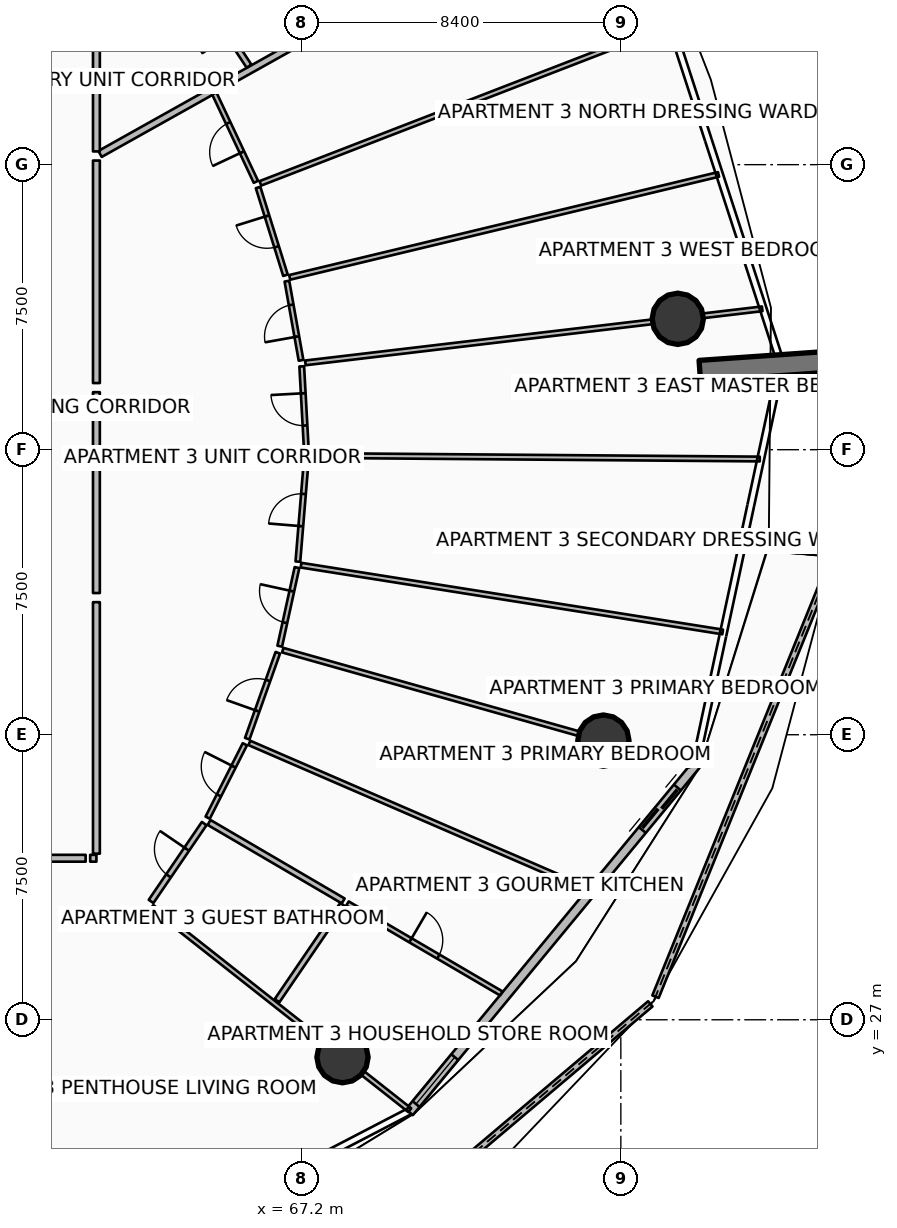
"""IFC4 building model, lengths in metres.
Left out: names, types, materials, properties, quantities, classifications, styles, units other than length and angle.
Written with IfcOpenShell. Run it as: python <this file> out.ifc"""

import sys

from ifc_helpers import new_model, si_unit, direction, frame, frame_2d, origin, origin_2d, place, context, subcontext, project, spatial, polyline, rectangle, circle, outline, extrude, element, fill, save


model = new_model("IFC4")
c1 = context("Model", 3, precision=1e-05, world=origin(), true_north=direction((0.0, 1.0)))
c2 = subcontext(c1, "Body", "Model", "MODEL_VIEW")
j1 = project(units=[si_unit("LENGTHUNIT", "METRE"), si_unit("PLANEANGLEUNIT", "RADIAN")], contexts=[c1])
p1 = place(None, origin())
s1 = spatial("IfcSite", under=j1, at=p1, CompositionType="ELEMENT")
p2 = place(p1, origin())
s2 = spatial("IfcBuilding", under=s1, at=p2, CompositionType="ELEMENT")
p3 = place(p2, frame((0.0, 0.0, 67.65)))
s3 = spatial("IfcBuildingStorey", under=s2, at=p3, CompositionType="ELEMENT", Elevation=67.65)
p4 = place(p3, frame((77.678, 44.075, 0.0), z_axis=(0.0, 0.0, 1.0), x_axis=(0.997564163539, 0.069754853754, 0.0)))
e1 = element("IfcWall", 1, at=p4, inside=s3, PredefinedType="SOLIDWALL", context=c2, shape_type="SweptSolid", body=[
    extrude(rectangle(XDim=3.5, YDim=0.55, at=frame_2d((1.75, 0.0))), origin(), (0.0, 0.0, 1.0), 3.75),
])
for number, where, z_axis, x_axis in (
    (2, (68.276, 26.016, 0.0), (0.0, 0.0, 1.0), (1.0, 0.0, 0.0)),
    (3, (75.141, 34.345, 0.0), (0.0, 0.0, 1.0), (1.0, 0.0, 0.0)),
    (4, (77.098, 45.444, 0.0), (0.0, 0.0, 1.0), (1.0, 0.0, 0.0)),
):
    element("IfcColumn", number, at=place(p3, frame(where, z_axis=z_axis, x_axis=x_axis)), inside=s3, PredefinedType="COLUMN", context=c2, shape_type="SweptSolid", body=[
        extrude(circle(Radius=0.675, at=origin_2d()), origin(), (0.0, 0.0, 1.0), 3.35),
    ])
p5 = place(p3, frame((67.267, 19.719, 0.0), z_axis=(0.0, 0.0, 1.0), x_axis=(0.763702211542, 0.645568688898, 0.0)))
e5 = element("IfcWall", 5, at=p5, inside=s3, PredefinedType="PARAPET", context=c2, shape_type="SweptSolid", body=[
    extrude(outline(polyline([(0.0, 0.0), (11.927, 0.0), (11.927, 1.632), (5.963, 1.798), (0.0, 1.86), (0.0, 0.0)])), frame((0.0, 0.09, 0.0), z_axis=(0.0, -1.0, 0.0), x_axis=(1.0, 0.0, 0.0)), (0.0, 0.0, 1.0), 0.18),
])
p6 = place(p3, frame((76.512, 27.607, 0.0), z_axis=(0.0, 0.0, 1.0), x_axis=(0.375733690411, 0.926727680546, 0.0)))
e6 = element("IfcWall", 6, at=p6, inside=s3, PredefinedType="PARAPET", context=c2, shape_type="SweptSolid", body=[
    extrude(outline(polyline([(0.0, 0.0), (12.491, 0.0), (12.491, 1.233), (6.246, 1.418), (0.0, 1.632), (0.0, 0.0)])), frame((0.0, 0.09, 0.0), z_axis=(0.0, -1.0, 0.0), x_axis=(1.0, 0.0, 0.0)), (0.0, 0.0, 1.0), 0.18),
])
p7 = place(p3, frame((70.033, 24.567, 0.0), z_axis=(0.0, 0.0, 1.0), x_axis=(0.636674332663, 0.771132799281, 0.0)))
e7 = element("IfcWall", 7, at=p7, inside=s3, PredefinedType="SOLIDWALL", context=c2, shape_type="SweptSolid", body=[
    extrude(rectangle(XDim=11.851, YDim=0.24, at=frame_2d((5.926, 0.0))), origin(), (0.0, 0.0, 1.0), 2.3),
])
p8 = place(p7, frame((9.631, 0.0, 0.0)))
e8 = element("IfcOpeningElement", 8, at=p8, cuts=e7, PredefinedType="OPENING", context=c2, shape_type="SweptSolid", body=[
    extrude(rectangle(XDim=1.45, YDim=2.15, at=frame_2d((0.725, 1.075))), frame((0.0, 0.13, 0.0), z_axis=(0.0, -1.0, 0.0), x_axis=(1.0, 0.0, 0.0)), (0.0, 0.0, 1.0), 0.26),
])
p9 = place(p7, frame((0.28, 0.0, 0.65)))
e9 = element("IfcOpeningElement", 9, at=p9, cuts=e7, PredefinedType="OPENING", context=c2, shape_type="SweptSolid", body=[
    extrude(rectangle(XDim=1.6, YDim=1.5, at=frame_2d((0.8, 0.75))), frame((0.0, 0.13, 0.0), z_axis=(0.0, -1.0, 0.0), x_axis=(1.0, 0.0, 0.0)), (0.0, 0.0, 1.0), 0.26),
])
p10 = place(p3, frame((61.896, 49.782, 0.0), z_axis=(0.0, 0.0, 1.0), x_axis=(0.872493215695, 0.488626225828, 0.0)))
e10 = element("IfcWall", 10, at=p10, inside=s3, PredefinedType="PARTITIONING", context=c2, shape_type="SweptSolid", body=[
    extrude(rectangle(XDim=15.612, YDim=0.18, at=frame_2d((7.806, 0.0))), origin(), (0.0, 0.0, 1.0), 2.717),
])
p11 = place(p3, frame((54.14, 31.25, 0.0), z_axis=(0.0, 0.0, 1.0), x_axis=(1.0, 0.0, 0.0)))
e11 = element("IfcWall", 11, at=p11, inside=s3, PredefinedType="PARTITIONING", context=c2, shape_type="SweptSolid", body=[
    extrude(rectangle(XDim=7.376, YDim=0.18, at=frame_2d((3.688, 0.0))), origin(), (0.0, 0.0, 1.0), 2.717),
])
p12 = place(p11, frame((3.138, 0.0, 0.0)))
e12 = element("IfcOpeningElement", 12, at=p12, cuts=e11, PredefinedType="OPENING", context=c2, shape_type="SweptSolid", body=[
    extrude(rectangle(XDim=1.1, YDim=2.1, at=frame_2d((0.55, 1.05))), frame((0.0, 0.1, 0.0), z_axis=(0.0, -1.0, 0.0), x_axis=(1.0, 0.0, 0.0)), (0.0, 0.0, 1.0), 0.2),
])
p13 = place(p3, frame((61.636, 31.25, 0.0), z_axis=(0.0, 0.0, 1.0), x_axis=(1.0, 0.0, 0.0)))
e13 = element("IfcWall", 13, at=p13, inside=s3, PredefinedType="PARTITIONING", context=c2, shape_type="SweptSolid", body=[
    extrude(rectangle(XDim=0.164, YDim=0.18, at=frame_2d((0.082, 0.0))), origin(), (0.0, 0.0, 1.0), 2.717),
])
p14 = place(p3, frame((61.8, 31.37, 0.0), z_axis=(0.0, 0.0, 1.0), x_axis=(0.0, 1.0, 0.0)))
e14 = element("IfcWall", 14, at=p14, inside=s3, PredefinedType="PARTITIONING", context=c2, shape_type="SweptSolid", body=[
    extrude(rectangle(XDim=6.618, YDim=0.18, at=frame_2d((3.309, 0.0))), origin(), (0.0, 0.0, 1.0), 2.717),
])
p15 = place(p3, frame((63.261, 29.969, 0.0), z_axis=(0.0, 0.0, 1.0), x_axis=(0.78531804627, -0.619092534443, 0.0)))
e15 = element("IfcWall", 15, at=p15, inside=s3, PredefinedType="PARTITIONING", context=c2, shape_type="SweptSolid", body=[
    extrude(rectangle(XDim=8.639, YDim=0.125, at=frame_2d((4.32, 0.0))), origin(), (0.0, 0.0, 1.0), 2.717),
])
p16 = place(p3, frame((63.239, 30.114, 0.0), z_axis=(0.0, 0.0, 1.0), x_axis=(0.563437614894, 0.826158613174, 0.0)))
e16 = element("IfcWall", 16, at=p16, inside=s3, PredefinedType="PARTITIONING", context=c2, shape_type="SweptSolid", body=[
    extrude(rectangle(XDim=2.48, YDim=0.15, at=frame_2d((1.24, 0.0))), origin(), (0.0, 0.0, 1.0), 2.717),
])
p17 = place(p16, frame((0.815, 0.0, 0.0)))
e17 = element("IfcOpeningElement", 17, at=p17, cuts=e16, PredefinedType="OPENING", context=c2, shape_type="SweptSolid", body=[
    extrude(rectangle(XDim=0.85, YDim=2.06, at=frame_2d((0.425, 1.03))), frame((0.0, 0.085, 0.0), z_axis=(0.0, -1.0, 0.0), x_axis=(1.0, 0.0, 0.0)), (0.0, 0.0, 1.0), 0.17),
])
p18 = place(p3, frame((66.553, 27.501, 0.0), z_axis=(0.0, 0.0, 1.0), x_axis=(0.563388764178, 0.826191927095, 0.0)))
e18 = element("IfcWall", 18, at=p18, inside=s3, PredefinedType="PARTITIONING", context=c2, shape_type="SweptSolid", body=[
    extrude(rectangle(XDim=3.063, YDim=0.15, at=frame_2d((1.531, 0.0))), origin(), (0.0, 0.0, 1.0), 2.717),
])
p19 = place(p3, frame((64.765, 32.192, 0.0), z_axis=(0.0, 0.0, 1.0), x_axis=(0.863128698129, -0.504984010109, 0.0)))
e19 = element("IfcWall", 19, at=p19, inside=s3, PredefinedType="PARTITIONING", context=c2, shape_type="SweptSolid", body=[
    extrude(rectangle(XDim=4.09, YDim=0.15, at=frame_2d((2.045, 0.0))), origin(), (0.0, 0.0, 1.0), 2.79),
])
p20 = place(p3, frame((68.407, 30.061, 0.0), z_axis=(0.0, 0.0, 1.0), x_axis=(0.863132370473, -0.504977733214, 0.0)))
e20 = element("IfcWall", 20, at=p20, inside=s3, PredefinedType="PARTITIONING", context=c2, shape_type="SweptSolid", body=[
    extrude(rectangle(XDim=4.689, YDim=0.125, at=frame_2d((2.345, 0.0))), origin(), (0.0, 0.0, 1.0), 2.79),
])
p21 = place(p20, frame((1.919, 0.0, 0.0)))
e21 = element("IfcOpeningElement", 21, at=p21, cuts=e20, PredefinedType="OPENING", context=c2, shape_type="SweptSolid", body=[
    extrude(rectangle(XDim=0.85, YDim=2.06, at=frame_2d((0.425, 1.03))), frame((0.0, 0.073, 0.0), z_axis=(0.0, -1.0, 0.0), x_axis=(1.0, 0.0, 0.0)), (0.0, 0.0, 1.0), 0.145),
])
p22 = place(p3, frame((65.825, 34.285, 0.0), z_axis=(0.0, 0.0, 1.0), x_axis=(0.917721842762, -0.39722363892, 0.0)))
e22 = element("IfcWall", 22, at=p22, inside=s3, PredefinedType="PARTITIONING", context=c2, shape_type="SweptSolid", body=[
    extrude(rectangle(XDim=9.694, YDim=0.125, at=frame_2d((4.847, 0.0))), origin(), (0.0, 0.0, 1.0), 2.79),
])
p23 = place(p3, frame((64.728, 32.317, 0.0), z_axis=(0.0, 0.0, 1.0), x_axis=(0.451897802863, 0.892069714634, 0.0)))
e23 = element("IfcWall", 23, at=p23, inside=s3, PredefinedType="PARTITIONING", context=c2, shape_type="SweptSolid", body=[
    extrude(rectangle(XDim=2.165, YDim=0.125, at=frame_2d((1.083, 0.0))), origin(), (0.0, 0.0, 1.0), 2.79),
])
p24 = place(p23, frame((0.658, 0.0, 0.0)))
e24 = element("IfcOpeningElement", 24, at=p24, cuts=e23, PredefinedType="OPENING", context=c2, shape_type="SweptSolid", body=[
    extrude(rectangle(XDim=0.85, YDim=2.06, at=frame_2d((0.425, 1.03))), frame((0.0, 0.073, 0.0), z_axis=(0.0, -1.0, 0.0), x_axis=(1.0, 0.0, 0.0)), (0.0, 0.0, 1.0), 0.145),
])
p25 = place(p3, frame((65.769, 34.396, 0.0), z_axis=(0.0, 0.0, 1.0), x_axis=(0.335079884685, 0.942189721277, 0.0)))
e25 = element("IfcWall", 25, at=p25, inside=s3, PredefinedType="PARTITIONING", context=c2, shape_type="SweptSolid", body=[
    extrude(rectangle(XDim=2.401, YDim=0.125, at=frame_2d((1.2, 0.0))), origin(), (0.0, 0.0, 1.0), 2.717),
])
p26 = place(p25, frame((0.775, 0.0, 0.0)))
e26 = element("IfcOpeningElement", 26, at=p26, cuts=e25, PredefinedType="OPENING", context=c2, shape_type="SweptSolid", body=[
    extrude(rectangle(XDim=0.85, YDim=2.06, at=frame_2d((0.425, 1.03))), frame((0.0, 0.073, 0.0), z_axis=(0.0, -1.0, 0.0), x_axis=(1.0, 0.0, 0.0)), (0.0, 0.0, 1.0), 0.145),
])
p27 = place(p3, frame((61.8, 38.228, 0.0), z_axis=(0.0, 0.0, 1.0), x_axis=(0.0, 1.0, 0.0)))
e27 = element("IfcWall", 27, at=p27, inside=s3, PredefinedType="PARTITIONING", context=c2, shape_type="SweptSolid", body=[
    extrude(rectangle(XDim=5.285, YDim=0.18, at=frame_2d((2.643, 0.0))), origin(), (0.0, 0.0, 1.0), 2.717),
])
p28 = place(p3, frame((66.703, 36.725, 0.0), z_axis=(0.0, 0.0, 1.0), x_axis=(0.962456868727, -0.271434662195, 0.0)))
e28 = element("IfcWall", 28, at=p28, inside=s3, PredefinedType="PARTITIONING", context=c2, shape_type="SweptSolid", body=[
    extrude(rectangle(XDim=11.141, YDim=0.125, at=frame_2d((5.571, 0.0))), origin(), (0.0, 0.0, 1.0), 2.717),
])
p29 = place(p3, frame((67.184, 38.962, 0.0), z_axis=(0.0, 0.0, 1.0), x_axis=(0.987685842404, -0.156450237182, 0.0)))
e29 = element("IfcWall", 29, at=p29, inside=s3, PredefinedType="PARTITIONING", context=c2, shape_type="SweptSolid", body=[
    extrude(rectangle(XDim=11.234, YDim=0.125, at=frame_2d((5.617, 0.0))), origin(), (0.0, 0.0, 1.0), 2.79),
])
p30 = place(p3, frame((67.422, 41.847, 0.0), z_axis=(0.0, 0.0, 1.0), x_axis=(0.999969106173, -0.007860451618, 0.0)))
e30 = element("IfcWall", 30, at=p30, inside=s3, PredefinedType="PARTITIONING", context=c2, shape_type="SweptSolid", body=[
    extrude(rectangle(XDim=11.833, YDim=0.125, at=frame_2d((5.917, 0.0))), origin(), (0.0, 0.0, 1.0), 2.79),
])
p31 = place(p3, frame((66.624, 36.83, 0.0), z_axis=(0.0, 0.0, 1.0), x_axis=(0.214316036982, 0.976764370917, 0.0)))
e31 = element("IfcWall", 31, at=p31, inside=s3, PredefinedType="PARTITIONING", context=c2, shape_type="SweptSolid", body=[
    extrude(rectangle(XDim=2.116, YDim=0.125, at=frame_2d((1.058, 0.0))), origin(), (0.0, 0.0, 1.0), 2.717),
])
p32 = place(p31, frame((0.633, 0.0, 0.0)))
e32 = element("IfcOpeningElement", 32, at=p32, cuts=e31, PredefinedType="OPENING", context=c2, shape_type="SweptSolid", body=[
    extrude(rectangle(XDim=0.85, YDim=2.06, at=frame_2d((0.425, 1.03))), frame((0.0, 0.073, 0.0), z_axis=(0.0, -1.0, 0.0), x_axis=(1.0, 0.0, 0.0)), (0.0, 0.0, 1.0), 0.145),
])
p33 = place(p3, frame((67.102, 39.055, 0.0), z_axis=(0.0, 0.0, 1.0), x_axis=(0.082325550285, 0.996605490538, 0.0)))
e33 = element("IfcWall", 33, at=p33, inside=s3, PredefinedType="PARTITIONING", context=c2, shape_type="SweptSolid", body=[
    extrude(rectangle(XDim=2.722, YDim=0.125, at=frame_2d((1.361, 0.0))), origin(), (0.0, 0.0, 1.0), 2.79),
])
p34 = place(p33, frame((0.936, 0.0, 0.0)))
e34 = element("IfcOpeningElement", 34, at=p34, cuts=e33, PredefinedType="OPENING", context=c2, shape_type="SweptSolid", body=[
    extrude(rectangle(XDim=0.85, YDim=2.06, at=frame_2d((0.425, 1.03))), frame((0.0, 0.073, 0.0), z_axis=(0.0, -1.0, 0.0), x_axis=(1.0, 0.0, 0.0)), (0.0, 0.0, 1.0), 0.145),
])
p35 = place(p3, frame((67.328, 41.928, 0.0), z_axis=(0.0, 0.0, 1.0), x_axis=(-0.054903584575, 0.998491660657, 0.0)))
e35 = element("IfcWall", 35, at=p35, inside=s3, PredefinedType="PARTITIONING", context=c2, shape_type="SweptSolid", body=[
    extrude(rectangle(XDim=2.268, YDim=0.125, at=frame_2d((1.134, 0.0))), origin(), (0.0, 0.0, 1.0), 2.717),
])
p36 = place(p35, frame((0.709, 0.0, 0.0)))
e36 = element("IfcOpeningElement", 36, at=p36, cuts=e35, PredefinedType="OPENING", context=c2, shape_type="SweptSolid", body=[
    extrude(rectangle(XDim=0.85, YDim=2.06, at=frame_2d((0.425, 1.03))), frame((0.0, 0.073, 0.0), z_axis=(0.0, -1.0, 0.0), x_axis=(1.0, 0.0, 0.0)), (0.0, 0.0, 1.0), 0.145),
])
p37 = place(p3, frame((61.8, 43.753, 0.0), z_axis=(0.0, 0.0, 1.0), x_axis=(0.0, 1.0, 0.0)))
e37 = element("IfcWall", 37, at=p37, inside=s3, PredefinedType="PARTITIONING", context=c2, shape_type="SweptSolid", body=[
    extrude(rectangle(XDim=5.855, YDim=0.18, at=frame_2d((2.927, 0.0))), origin(), (0.0, 0.0, 1.0), 2.717),
])
p38 = place(p3, frame((67.298, 44.284, 0.0), z_axis=(0.0, 0.0, 1.0), x_axis=(0.993068589749, 0.117536275483, 0.0)))
e38 = element("IfcWall", 38, at=p38, inside=s3, PredefinedType="PARTITIONING", context=c2, shape_type="SweptSolid", body=[
    extrude(rectangle(XDim=12.106, YDim=0.125, at=frame_2d((6.053, 0.0))), origin(), (0.0, 0.0, 1.0), 2.717),
])
p39 = place(p3, frame((66.886, 46.534, 0.0), z_axis=(0.0, 0.0, 1.0), x_axis=(0.972368393799, 0.233451722507, 0.0)))
e39 = element("IfcWall", 39, at=p39, inside=s3, PredefinedType="PARTITIONING", context=c2, shape_type="SweptSolid", body=[
    extrude(rectangle(XDim=11.605, YDim=0.125, at=frame_2d((5.802, 0.0))), origin(), (0.0, 0.0, 1.0), 2.79),
])
p40 = place(p3, frame((66.115, 49.008, 0.0), z_axis=(0.0, 0.0, 1.0), x_axis=(0.932641955578, 0.360803246514, 0.0)))
e40 = element("IfcWall", 40, at=p40, inside=s3, PredefinedType="PARTITIONING", context=c2, shape_type="SweptSolid", body=[
    extrude(rectangle(XDim=11.556, YDim=0.125, at=frame_2d((5.778, 0.0))), origin(), (0.0, 0.0, 1.0), 2.79),
])
p41 = place(p3, frame((67.185, 44.351, 0.0), z_axis=(0.0, 0.0, 1.0), x_axis=(-0.175726743029, 0.984438983271, 0.0)))
e41 = element("IfcWall", 41, at=p41, inside=s3, PredefinedType="PARTITIONING", context=c2, shape_type="SweptSolid", body=[
    extrude(rectangle(XDim=2.116, YDim=0.125, at=frame_2d((1.058, 0.0))), origin(), (0.0, 0.0, 1.0), 2.717),
])
p42 = place(p41, frame((0.633, 0.0, 0.0)))
e42 = element("IfcOpeningElement", 42, at=p42, cuts=e41, PredefinedType="OPENING", context=c2, shape_type="SweptSolid", body=[
    extrude(rectangle(XDim=0.85, YDim=2.06, at=frame_2d((0.425, 1.03))), frame((0.0, 0.073, 0.0), z_axis=(0.0, -1.0, 0.0), x_axis=(1.0, 0.0, 0.0)), (0.0, 0.0, 1.0), 0.145),
])
p43 = place(p3, frame((66.775, 46.59, 0.0), z_axis=(0.0, 0.0, 1.0), x_axis=(-0.297792299564, 0.954630685826, 0.0)))
e43 = element("IfcWall", 43, at=p43, inside=s3, PredefinedType="PARTITIONING", context=c2, shape_type="SweptSolid", body=[
    extrude(rectangle(XDim=2.419, YDim=0.125, at=frame_2d((1.21, 0.0))), origin(), (0.0, 0.0, 1.0), 2.79),
])
p44 = place(p43, frame((0.785, 0.0, 0.0)))
e44 = element("IfcOpeningElement", 44, at=p44, cuts=e43, PredefinedType="OPENING", context=c2, shape_type="SweptSolid", body=[
    extrude(rectangle(XDim=0.85, YDim=2.06, at=frame_2d((0.425, 1.03))), frame((0.0, 0.073, 0.0), z_axis=(0.0, -1.0, 0.0), x_axis=(1.0, 0.0, 0.0)), (0.0, 0.0, 1.0), 0.145),
])
p45 = place(p3, frame((65.997, 49.048, 0.0), z_axis=(0.0, 0.0, 1.0), x_axis=(-0.425774166793, 0.904829463983, 0.0)))
e45 = element("IfcWall", 45, at=p45, inside=s3, PredefinedType="PARTITIONING", context=c2, shape_type="SweptSolid", body=[
    extrude(rectangle(XDim=2.571, YDim=0.125, at=frame_2d((1.285, 0.0))), origin(), (0.0, 0.0, 1.0), 2.717),
])
p46 = place(p45, frame((0.86, 0.0, 0.0)))
e46 = element("IfcOpeningElement", 46, at=p46, cuts=e45, PredefinedType="OPENING", context=c2, shape_type="SweptSolid", body=[
    extrude(rectangle(XDim=0.85, YDim=2.06, at=frame_2d((0.425, 1.03))), frame((0.0, 0.073, 0.0), z_axis=(0.0, -1.0, 0.0), x_axis=(1.0, 0.0, 0.0)), (0.0, 0.0, 1.0), 0.145),
])
p47 = place(p3, frame((61.8, 49.848, 0.0), z_axis=(0.0, 0.0, 1.0), x_axis=(0.0, 1.0, 0.0)))
e47 = element("IfcWall", 47, at=p47, inside=s3, PredefinedType="PARTITIONING", context=c2, shape_type="SweptSolid", body=[
    extrude(rectangle(XDim=2.781, YDim=0.18, at=frame_2d((1.391, 0.0))), origin(), (0.0, 0.0, 1.0), 2.717),
])
p48 = place(p3, frame((65.816, 52.092, 0.0), z_axis=(0.0, 0.0, 1.0), x_axis=(-0.550532146696, 0.834813964578, 0.0)))
e48 = element("IfcWall", 48, at=p48, inside=s3, PredefinedType="PARTITIONING", context=c2, shape_type="SweptSolid", body=[
    extrude(rectangle(XDim=2.776, YDim=0.15, at=frame_2d((1.388, 0.0))), origin(), (0.0, 0.0, 1.0), 2.717),
])
p49 = place(p48, frame((0.963, 0.0, 0.0)))
e49 = element("IfcOpeningElement", 49, at=p49, cuts=e48, PredefinedType="OPENING", context=c2, shape_type="SweptSolid", body=[
    extrude(rectangle(XDim=0.85, YDim=2.06, at=frame_2d((0.425, 1.03))), frame((0.0, 0.085, 0.0), z_axis=(0.0, -1.0, 0.0), x_axis=(1.0, 0.0, 0.0)), (0.0, 0.0, 1.0), 0.17),
])
p50 = place(p8, origin())
e50 = element("IfcDoor", 50, at=p50, inside=s3, OperationType="DOUBLE_DOOR_SLIDING", PredefinedType="DOOR", context=c2, shape_type="SweptSolid", body=[
    extrude(rectangle(XDim=1.45, YDim=2.15, at=frame_2d((0.725, 1.075))), frame((0.0, 0.025, 0.0), z_axis=(0.0, -1.0, 0.0), x_axis=(1.0, 0.0, 0.0)), (0.0, 0.0, 1.0), 0.05),
])
fill(e8, e50)
p51 = place(p9, origin())
e51 = element("IfcWindow", 51, at=p51, inside=s3, PartitioningType="SINGLE_PANEL", PredefinedType="WINDOW", context=c2, shape_type="SweptSolid", body=[
    extrude(rectangle(XDim=1.6, YDim=1.5, at=frame_2d((0.8, 0.75))), frame((0.0, 0.03, 0.0), z_axis=(0.0, -1.0, 0.0), x_axis=(1.0, 0.0, 0.0)), (0.0, 0.0, 1.0), 0.06),
])
fill(e9, e51)
p52 = place(p17, origin())
e52 = element("IfcDoor", 52, at=p52, inside=s3, OperationType="SINGLE_SWING_RIGHT", PredefinedType="DOOR", context=c2, shape_type="SweptSolid", body=[
    extrude(rectangle(XDim=0.85, YDim=2.06, at=frame_2d((0.425, 1.03))), frame((0.0, 0.025, 0.0), z_axis=(0.0, -1.0, 0.0), x_axis=(1.0, 0.0, 0.0)), (0.0, 0.0, 1.0), 0.05),
])
fill(e17, e52)
p53 = place(p21, origin())
e53 = element("IfcDoor", 53, at=p53, inside=s3, OperationType="SINGLE_SWING_LEFT", PredefinedType="DOOR", context=c2, shape_type="SweptSolid", body=[
    extrude(rectangle(XDim=0.85, YDim=2.06, at=frame_2d((0.425, 1.03))), frame((0.0, 0.025, 0.0), z_axis=(0.0, -1.0, 0.0), x_axis=(1.0, 0.0, 0.0)), (0.0, 0.0, 1.0), 0.05),
])
fill(e21, e53)
p54 = place(p24, origin())
e54 = element("IfcDoor", 54, at=p54, inside=s3, OperationType="SINGLE_SWING_RIGHT", PredefinedType="DOOR", context=c2, shape_type="SweptSolid", body=[
    extrude(rectangle(XDim=0.85, YDim=2.06, at=frame_2d((0.425, 1.03))), frame((0.0, 0.025, 0.0), z_axis=(0.0, -1.0, 0.0), x_axis=(1.0, 0.0, 0.0)), (0.0, 0.0, 1.0), 0.05),
])
fill(e24, e54)
p55 = place(p26, origin())
e55 = element("IfcDoor", 55, at=p55, inside=s3, OperationType="SINGLE_SWING_LEFT", PredefinedType="DOOR", context=c2, shape_type="SweptSolid", body=[
    extrude(rectangle(XDim=0.85, YDim=2.06, at=frame_2d((0.425, 1.03))), frame((0.0, 0.025, 0.0), z_axis=(0.0, -1.0, 0.0), x_axis=(1.0, 0.0, 0.0)), (0.0, 0.0, 1.0), 0.05),
])
fill(e26, e55)
p56 = place(p32, origin())
e56 = element("IfcDoor", 56, at=p56, inside=s3, OperationType="SINGLE_SWING_RIGHT", PredefinedType="DOOR", context=c2, shape_type="SweptSolid", body=[
    extrude(rectangle(XDim=0.85, YDim=2.06, at=frame_2d((0.425, 1.03))), frame((0.0, 0.025, 0.0), z_axis=(0.0, -1.0, 0.0), x_axis=(1.0, 0.0, 0.0)), (0.0, 0.0, 1.0), 0.05),
])
fill(e32, e56)
p57 = place(p34, origin())
e57 = element("IfcDoor", 57, at=p57, inside=s3, OperationType="SINGLE_SWING_LEFT", PredefinedType="DOOR", context=c2, shape_type="SweptSolid", body=[
    extrude(rectangle(XDim=0.85, YDim=2.06, at=frame_2d((0.425, 1.03))), frame((0.0, 0.025, 0.0), z_axis=(0.0, -1.0, 0.0), x_axis=(1.0, 0.0, 0.0)), (0.0, 0.0, 1.0), 0.05),
])
fill(e34, e57)
p58 = place(p36, origin())
e58 = element("IfcDoor", 58, at=p58, inside=s3, OperationType="SINGLE_SWING_RIGHT", PredefinedType="DOOR", context=c2, shape_type="SweptSolid", body=[
    extrude(rectangle(XDim=0.85, YDim=2.06, at=frame_2d((0.425, 1.03))), frame((0.0, 0.025, 0.0), z_axis=(0.0, -1.0, 0.0), x_axis=(1.0, 0.0, 0.0)), (0.0, 0.0, 1.0), 0.05),
])
fill(e36, e58)
p59 = place(p42, origin())
e59 = element("IfcDoor", 59, at=p59, inside=s3, OperationType="SINGLE_SWING_LEFT", PredefinedType="DOOR", context=c2, shape_type="SweptSolid", body=[
    extrude(rectangle(XDim=0.85, YDim=2.06, at=frame_2d((0.425, 1.03))), frame((0.0, 0.025, 0.0), z_axis=(0.0, -1.0, 0.0), x_axis=(1.0, 0.0, 0.0)), (0.0, 0.0, 1.0), 0.05),
])
fill(e42, e59)
p60 = place(p44, origin())
e60 = element("IfcDoor", 60, at=p60, inside=s3, OperationType="SINGLE_SWING_RIGHT", PredefinedType="DOOR", context=c2, shape_type="SweptSolid", body=[
    extrude(rectangle(XDim=0.85, YDim=2.06, at=frame_2d((0.425, 1.03))), frame((0.0, 0.025, 0.0), z_axis=(0.0, -1.0, 0.0), x_axis=(1.0, 0.0, 0.0)), (0.0, 0.0, 1.0), 0.05),
])
fill(e44, e60)
p61 = place(p46, origin())
e61 = element("IfcDoor", 61, at=p61, inside=s3, OperationType="SINGLE_SWING_LEFT", PredefinedType="DOOR", context=c2, shape_type="SweptSolid", body=[
    extrude(rectangle(XDim=0.85, YDim=2.06, at=frame_2d((0.425, 1.03))), frame((0.0, 0.025, 0.0), z_axis=(0.0, -1.0, 0.0), x_axis=(1.0, 0.0, 0.0)), (0.0, 0.0, 1.0), 0.05),
])
fill(e46, e61)
save(model, sys.argv[1])
